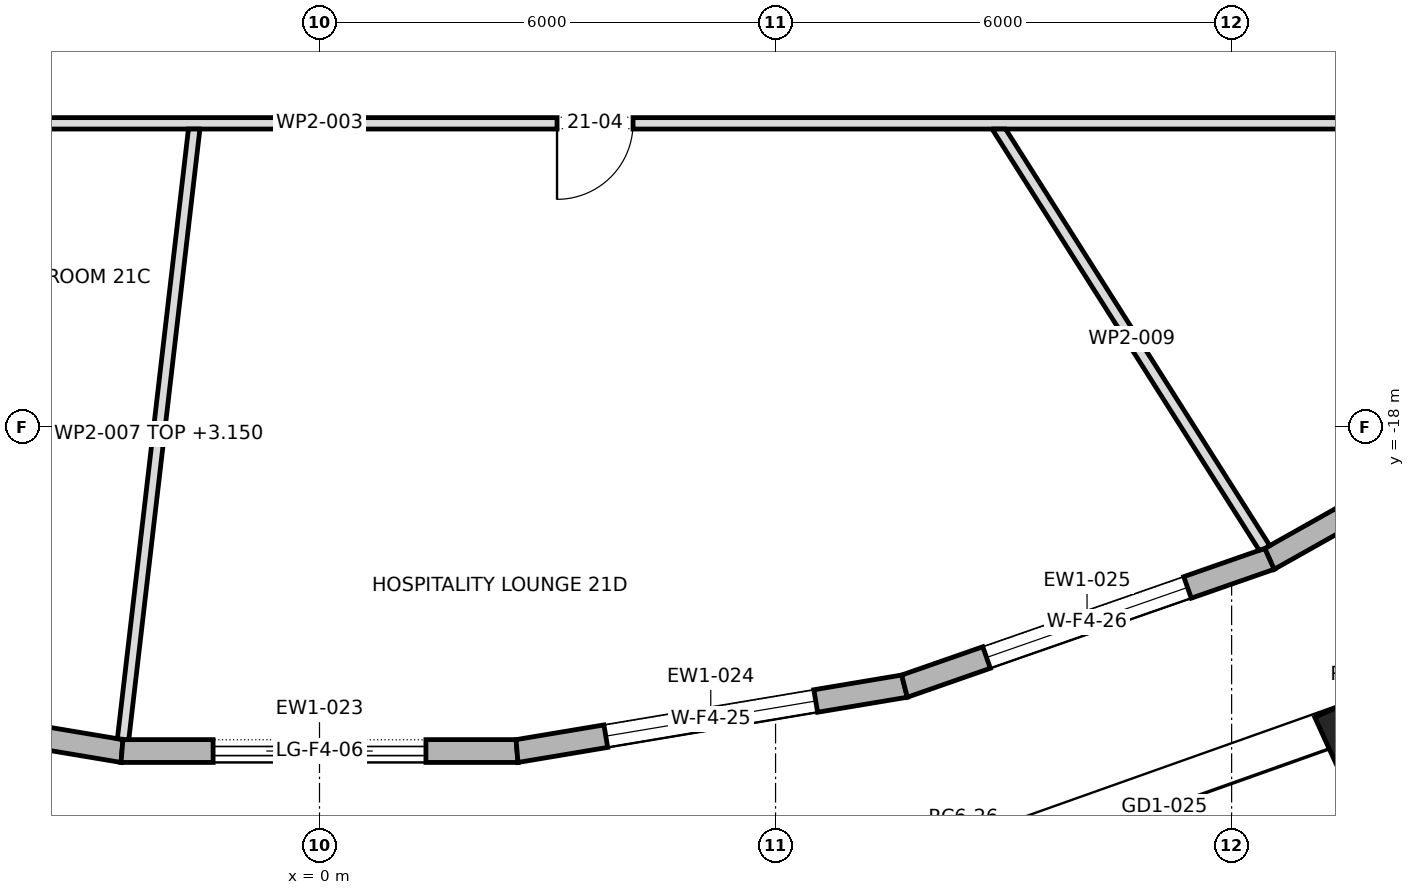
"""IFC4 building model, lengths in metres.
Left out: names, types, materials, properties, quantities, classifications, styles, units other than length and angle.
Written with IfcOpenShell. Run it as: python <this file> out.ifc"""

import sys

from ifc_helpers import new_model, si_unit, direction, frame, frame_2d, origin, origin_2d, place, context, subcontext, project, spatial, polyline, rectangle, outline, extrude, element, fill, save


model = new_model("IFC4")
c1 = context("Model", 3, precision=1e-05, world=origin(), true_north=direction((0.0, 1.0)))
c2 = subcontext(c1, "Body", "Model", "MODEL_VIEW")
j1 = project(units=[si_unit("LENGTHUNIT", "METRE"), si_unit("PLANEANGLEUNIT", "RADIAN")], contexts=[c1])
p1 = place(None, origin())
s1 = spatial("IfcSite", under=j1, at=p1, CompositionType="ELEMENT")
p2 = place(p1, origin())
s2 = spatial("IfcBuilding", under=s1, at=p2, CompositionType="ELEMENT")
p3 = place(p2, frame((0.0, 0.0, 292.3)))
s3 = spatial("IfcBuildingStorey", under=s2, at=p3, CompositionType="ELEMENT", Elevation=292.3)
p4 = place(p3, frame((13.757, -22.061, 0.0), z_axis=(0.0, 0.0, 1.0), x_axis=(0.909128549752, 0.416515641994, 0.0)))
e1 = element("IfcColumn", 1, at=p4, inside=s3, PredefinedType="COLUMN", context=c2, shape_type="SweptSolid", body=[
    extrude(rectangle(XDim=1.0, YDim=1.0, at=origin_2d()), origin(), (0.0, 0.0, 1.0), 4.0),
])
p5 = place(p3, frame((-7.696, -21.404, 0.0), z_axis=(0.0, 0.0, 1.0), x_axis=(0.986263399459, -0.165180225475, 0.0)))
e2 = element("IfcWall", 2, at=p5, inside=s3, PredefinedType="STANDARD", context=c2, shape_type="SweptSolid", body=[
    extrude(outline(polyline([(-0.013, -0.15), (5.181, -0.15), (5.156, 0.15), (0.013, 0.15), (-0.013, -0.15)])), origin(), (0.0, 0.0, 1.0), 3.7),
])
p6 = place(p5, frame((1.184, 0.0, 0.6)))
e3 = element("IfcOpeningElement", 3, at=p6, cuts=e2, PredefinedType="OPENING", context=c2, shape_type="SweptSolid", body=[
    extrude(rectangle(XDim=2.8, YDim=2.65, at=frame_2d((1.4, 1.325))), frame((0.0, 0.162, 0.0), z_axis=(0.0, -1.0, 0.0), x_axis=(1.0, 0.0, 0.0)), (0.0, 0.0, 1.0), 0.324),
])
p7 = place(p3, frame((-2.599, -22.258, 0.0), z_axis=(0.0, 0.0, 1.0), x_axis=(1.0, 0.0, 0.0)))
e4 = element("IfcWall", 4, at=p7, inside=s3, PredefinedType="STANDARD", context=c2, shape_type="SweptSolid", body=[
    extrude(outline(polyline([(-0.012, -0.15), (5.21, -0.15), (5.185, 0.15), (0.012, 0.15), (-0.012, -0.15)])), origin(), (0.0, 0.0, 1.0), 3.7),
])
p8 = place(p7, frame((1.198, 0.0, 0.0)))
e5 = element("IfcOpeningElement", 5, at=p8, cuts=e4, PredefinedType="OPENING", context=c2, shape_type="SweptSolid", body=[
    extrude(rectangle(XDim=2.8, YDim=3.25, at=frame_2d((1.4, 1.625))), frame((0.0, 0.162, 0.0), z_axis=(0.0, -1.0, 0.0), x_axis=(1.0, 0.0, 0.0)), (0.0, 0.0, 1.0), 0.324),
])
p9 = place(p3, frame((2.599, -22.258, 0.0), z_axis=(0.0, 0.0, 1.0), x_axis=(0.986263399459, 0.165180225475, 0.0)))
e6 = element("IfcWall", 6, at=p9, inside=s3, PredefinedType="STANDARD", context=c2, shape_type="SweptSolid", body=[
    extrude(outline(polyline([(-0.012, -0.15), (5.181, -0.15), (5.156, 0.15), (0.012, 0.15), (-0.012, -0.15)])), origin(), (0.0, 0.0, 1.0), 3.7),
])
p10 = place(p9, frame((1.184, 0.0, 0.6)))
e7 = element("IfcOpeningElement", 7, at=p10, cuts=e6, PredefinedType="OPENING", context=c2, shape_type="SweptSolid", body=[
    extrude(rectangle(XDim=2.8, YDim=2.65, at=frame_2d((1.4, 1.325))), frame((0.0, 0.162, 0.0), z_axis=(0.0, -1.0, 0.0), x_axis=(1.0, 0.0, 0.0)), (0.0, 0.0, 1.0), 0.324),
])
p11 = place(p3, frame((7.696, -21.404, 0.0), z_axis=(0.0, 0.0, 1.0), x_axis=(0.944230376095, 0.329285585564, 0.0)))
e8 = element("IfcWall", 8, at=p11, inside=s3, PredefinedType="STANDARD", context=c2, shape_type="SweptSolid", body=[
    extrude(outline(polyline([(-0.013, -0.15), (5.1, -0.15), (5.073, 0.15), (0.013, 0.15), (-0.013, -0.15)])), origin(), (0.0, 0.0, 1.0), 3.7),
])
p12 = place(p11, frame((1.143, 0.0, 0.6)))
e9 = element("IfcOpeningElement", 9, at=p12, cuts=e8, PredefinedType="OPENING", context=c2, shape_type="SweptSolid", body=[
    extrude(rectangle(XDim=2.8, YDim=2.65, at=frame_2d((1.4, 1.325))), frame((0.0, 0.162, 0.0), z_axis=(0.0, -1.0, 0.0), x_axis=(1.0, 0.0, 0.0)), (0.0, 0.0, 1.0), 0.324),
])
p13 = place(p3, frame((12.5, -19.729, 0.0), z_axis=(0.0, 0.0, 1.0), x_axis=(0.871512454536, 0.490373369575, 0.0)))
e10 = element("IfcWall", 10, at=p13, inside=s3, PredefinedType="STANDARD", context=c2, shape_type="SweptSolid", body=[
    extrude(outline(polyline([(-0.013, -0.15), (4.976, -0.15), (4.948, 0.15), (0.013, 0.15), (-0.013, -0.15)])), origin(), (0.0, 0.0, 1.0), 3.7),
])
p14 = place(p13, frame((1.081, 0.0, 0.6)))
e11 = element("IfcOpeningElement", 11, at=p14, cuts=e10, PredefinedType="OPENING", context=c2, shape_type="SweptSolid", body=[
    extrude(rectangle(XDim=2.8, YDim=2.65, at=frame_2d((1.4, 1.325))), frame((0.0, 0.162, 0.0), z_axis=(0.0, -1.0, 0.0), x_axis=(1.0, 0.0, 0.0)), (0.0, 0.0, 1.0), 0.324),
])
p15 = place(p3, frame((-14.075, -14.0, 0.0), z_axis=(0.0, 0.0, 1.0), x_axis=(1.0, 0.0, 0.0)))
e12 = element("IfcWall", 12, at=p15, inside=s3, PredefinedType="PARTITIONING", context=c2, shape_type="SweptSolid", body=[
    extrude(outline(polyline([(0.0, -0.075), (1.877, -0.075), (3.753, -0.075), (5.63, -0.075), (7.507, -0.075), (9.383, -0.075), (11.26, -0.075), (13.137, -0.075), (15.013, -0.075), (16.89, -0.075), (18.767, -0.075), (20.643, -0.075), (22.52, -0.075), (24.396, -0.075), (26.273, -0.075), (28.15, -0.075), (28.0, 0.075), (26.011, 0.075), (24.021, 0.075), (22.032, 0.075), (20.043, 0.075), (18.053, 0.075), (16.064, 0.075), (14.075, 0.075), (12.086, 0.075), (10.096, 0.075), (8.107, 0.075), (6.118, 0.075), (4.128, 0.075), (2.139, 0.075), (0.15, 0.075), (0.0, -0.075)])), origin(), (0.0, 0.0, 1.0), 3.7),
])
p16 = place(p15, frame((5.93, 0.0, 0.0)))
e13 = element("IfcOpeningElement", 13, at=p16, cuts=e12, PredefinedType="OPENING", context=c2, shape_type="SweptSolid", body=[
    extrude(rectangle(XDim=1.0, YDim=2.1, at=frame_2d((0.5, 1.05))), frame((0.0, 0.087, 0.0), z_axis=(0.0, -1.0, 0.0), x_axis=(1.0, 0.0, 0.0)), (0.0, 0.0, 1.0), 0.174),
])
p17 = place(p15, frame((17.2, 0.0, 0.0)))
e14 = element("IfcOpeningElement", 14, at=p17, cuts=e12, PredefinedType="OPENING", context=c2, shape_type="SweptSolid", body=[
    extrude(rectangle(XDim=1.0, YDim=2.1, at=frame_2d((0.5, 1.05))), frame((0.0, 0.087, 0.0), z_axis=(0.0, -1.0, 0.0), x_axis=(1.0, 0.0, 0.0)), (0.0, 0.0, 1.0), 0.174),
])
p18 = place(p3, frame((-1.648, -14.066, 0.0), z_axis=(0.0, 0.0, 1.0), x_axis=(-0.115734847025, -0.993280144362, 0.0)))
e15 = element("IfcWall", 15, at=p18, inside=s3, PredefinedType="PARTITIONING", context=c2, shape_type="SweptSolid", body=[
    extrude(outline(polyline([(8.092, -0.075), (8.092, 0.034), (8.087, 0.075), (6.47, 0.075), (4.852, 0.075), (3.235, 0.075), (1.617, 0.075), (0.0, 0.075), (0.0, 0.074), (0.017, -0.075), (1.632, -0.075), (3.247, -0.075), (4.862, -0.075), (6.477, -0.075), (8.092, -0.075)])), origin(), (0.0, 0.0, 1.0), 3.15),
])
p19 = place(p3, frame((8.912, -14.035, 0.0), z_axis=(0.0, 0.0, 1.0), x_axis=(0.535569757711, -0.844490991442, 0.0)))
e16 = element("IfcWall", 16, at=p19, inside=s3, PredefinedType="PARTITIONING", context=c2, shape_type="SweptSolid", body=[
    extrude(outline(polyline([(0.0, -0.075), (1.641, -0.075), (3.281, -0.075), (4.922, -0.075), (6.563, -0.075), (6.581, 0.001), (6.585, 0.073), (6.585, 0.075), (4.962, 0.075), (3.34, 0.075), (1.718, 0.075), (0.095, 0.075), (0.0, -0.075), (0.0, -0.075)])), origin(), (0.0, 0.0, 1.0), 3.7),
])
p20 = place(p8, origin())
e17 = element("IfcDoor", 17, at=p20, inside=s3, OperationType="DOUBLE_DOOR_SLIDING", PredefinedType="DOOR", context=c2, shape_type="SweptSolid", body=[
    extrude(rectangle(XDim=2.8, YDim=3.25, at=frame_2d((1.4, 1.625))), frame((0.0, 0.025, 0.0), z_axis=(0.0, -1.0, 0.0), x_axis=(1.0, 0.0, 0.0)), (0.0, 0.0, 1.0), 0.05),
])
fill(e5, e17)
p21 = place(p10, origin())
e18 = element("IfcWindow", 18, at=p21, inside=s3, PartitioningType="DOUBLE_PANEL_VERTICAL", PredefinedType="WINDOW", context=c2, shape_type="SweptSolid", body=[
    extrude(rectangle(XDim=2.8, YDim=2.65, at=frame_2d((1.4, 1.325))), frame((0.0, 0.03, 0.0), z_axis=(0.0, -1.0, 0.0), x_axis=(1.0, 0.0, 0.0)), (0.0, 0.0, 1.0), 0.06),
])
fill(e7, e18)
p22 = place(p12, origin())
e19 = element("IfcWindow", 19, at=p22, inside=s3, PartitioningType="DOUBLE_PANEL_VERTICAL", PredefinedType="WINDOW", context=c2, shape_type="SweptSolid", body=[
    extrude(rectangle(XDim=2.8, YDim=2.65, at=frame_2d((1.4, 1.325))), frame((0.0, 0.03, 0.0), z_axis=(0.0, -1.0, 0.0), x_axis=(1.0, 0.0, 0.0)), (0.0, 0.0, 1.0), 0.06),
])
fill(e9, e19)
p23 = place(p17, frame((1.0, 0.0, 0.0), z_axis=(0.0, 0.0, 1.0), x_axis=(-1.0, 0.0, 0.0)))
e20 = element("IfcDoor", 20, at=p23, inside=s3, OperationType="SINGLE_SWING_LEFT", PredefinedType="DOOR", context=c2, shape_type="SweptSolid", body=[
    extrude(rectangle(XDim=1.0, YDim=2.1, at=frame_2d((0.5, 1.05))), frame((0.0, 0.025, 0.0), z_axis=(0.0, -1.0, 0.0), x_axis=(1.0, 0.0, 0.0)), (0.0, 0.0, 1.0), 0.05),
])
fill(e14, e20)
save(model, sys.argv[1])
